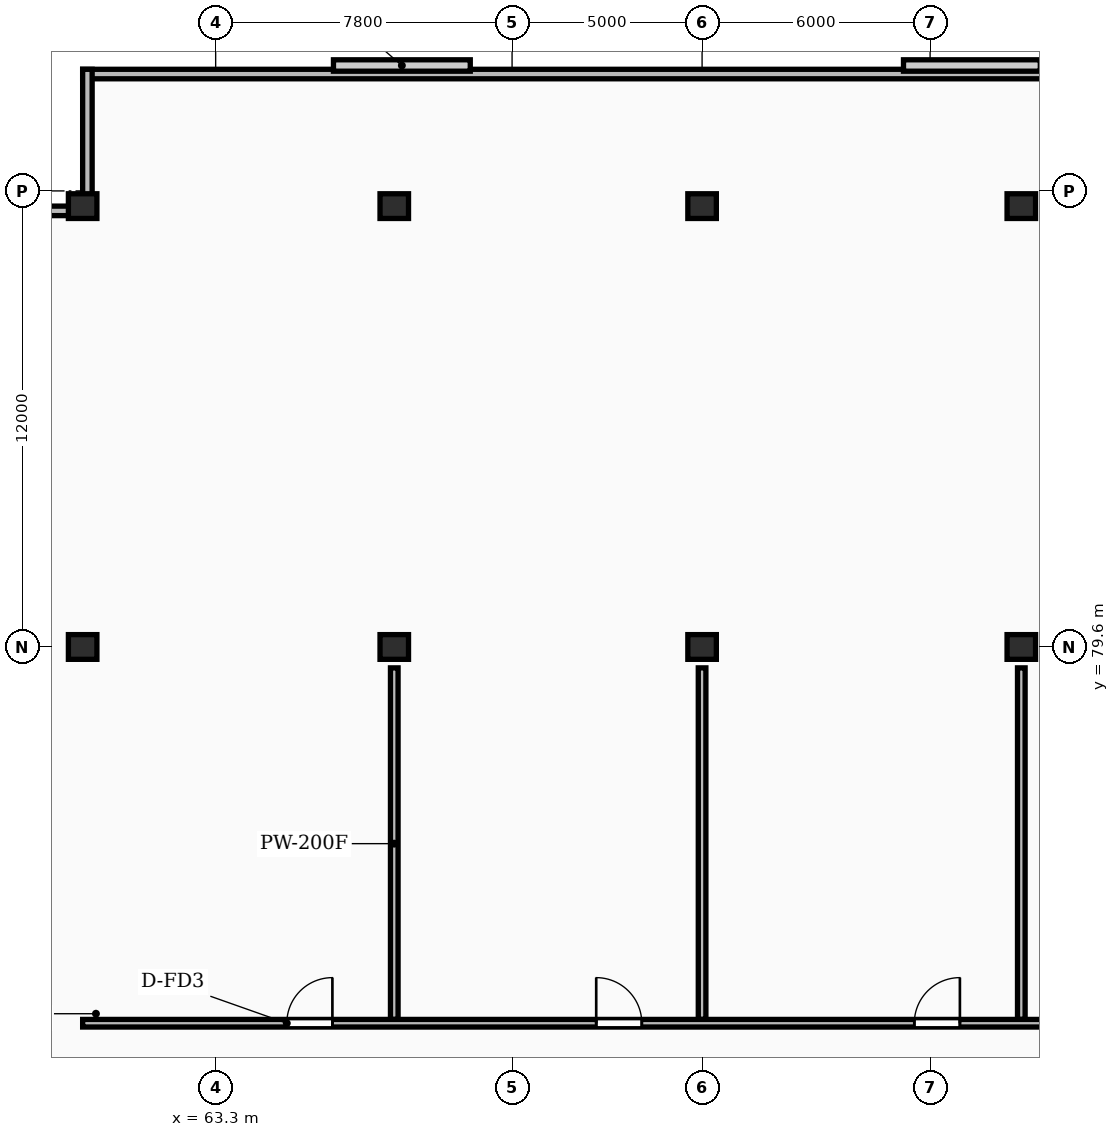
"""IFC4 building model, lengths in metres.
Left out: names, types, materials, properties, quantities, classifications, styles, units other than length and angle.
Written with IfcOpenShell. Run it as: python <this file> out.ifc"""

import sys

from ifc_helpers import new_model, si_unit, direction, frame, frame_2d, origin, origin_2d, place, context, subcontext, project, spatial, rectangle, extrude, element, fill, save


model = new_model("IFC4")
c1 = context("Model", 3, precision=1e-05, world=origin(), true_north=direction((0.0, 1.0)))
c2 = subcontext(c1, "Body", "Model", "MODEL_VIEW")
j1 = project(units=[si_unit("LENGTHUNIT", "METRE"), si_unit("PLANEANGLEUNIT", "RADIAN")], contexts=[c1])
p1 = place(None, origin())
s1 = spatial("IfcSite", under=j1, at=p1, CompositionType="ELEMENT")
p2 = place(p1, origin())
s2 = spatial("IfcBuilding", under=s1, at=p2, CompositionType="ELEMENT")
p3 = place(p2, frame((0.0, 0.0, 259.7)))
s3 = spatial("IfcBuildingStorey", under=s2, at=p3, CompositionType="ELEMENT", Elevation=259.7)
for number, where, z_axis, x_axis in (
    (1, (59.8, 79.6, 0.0), (0.0, 0.0, 1.0), (1.0, 0.0, 0.0)),
    (2, (59.8, 91.2, 0.0), (0.0, 0.0, 1.0), (1.0, 0.0, 0.0)),
    (3, (68.0, 79.6, 0.0), (0.0, 0.0, 1.0), (1.0, 0.0, 0.0)),
    (4, (68.0, 91.2, 0.0), (0.0, 0.0, 1.0), (1.0, 0.0, 0.0)),
    (5, (76.1, 79.6, 0.0), (0.0, 0.0, 1.0), (1.0, 0.0, 0.0)),
    (6, (76.1, 91.2, 0.0), (0.0, 0.0, 1.0), (1.0, 0.0, 0.0)),
    (7, (84.5, 79.6, 0.0), (0.0, 0.0, 1.0), (1.0, 0.0, 0.0)),
    (8, (84.5, 91.2, 0.0), (0.0, 0.0, 1.0), (1.0, 0.0, 0.0)),
):
    element("IfcColumn", number, at=place(p3, frame(where, z_axis=z_axis, x_axis=x_axis)), inside=s3, PredefinedType="COLUMN", context=c2, shape_type="SweptSolid", body=[
        extrude(rectangle(XDim=0.75, YDim=0.65, at=origin_2d()), origin(), (0.0, 0.0, 1.0), 4.5),
    ])
p4 = place(p3, frame((128.4, 94.675, 0.0), z_axis=(0.0, 0.0, 1.0), x_axis=(-1.0, 0.0, 0.0)))
e9 = element("IfcWall", 9, at=p4, inside=s3, PredefinedType="SHEAR", context=c2, shape_type="SweptSolid", body=[
    extrude(rectangle(XDim=68.6, YDim=0.25, at=frame_2d((34.3, 0.0))), origin(), (0.0, 0.0, 1.0), 4.23),
])
for number, where, z_axis, x_axis in (
    (10, (59.925, 94.8, 0.0), (0.0, 0.0, 1.0), (0.0, -1.0, 0.0)),
    (11, (59.8, 91.075, 0.0), (0.0, 0.0, 1.0), (-1.0, 0.0, 0.0)),
):
    element("IfcWall", number, at=place(p3, frame(where, z_axis=z_axis, x_axis=x_axis)), inside=s3, PredefinedType="SHEAR", context=c2, shape_type="SweptSolid", body=[
        extrude(rectangle(XDim=3.6, YDim=0.25, at=frame_2d((1.8, 0.0))), origin(), (0.0, 0.0, 1.0), 4.23),
    ])
for number, where, z_axis, x_axis in (
    (12, (68.0, 69.8, 0.0), (0.0, 0.0, 1.0), (0.0, 1.0, 0.0)),
    (13, (76.1, 69.8, 0.0), (0.0, 0.0, 1.0), (0.0, 1.0, 0.0)),
    (14, (84.5, 69.8, 0.0), (0.0, 0.0, 1.0), (0.0, 1.0, 0.0)),
):
    element("IfcWall", number, at=place(p3, frame(where, z_axis=z_axis, x_axis=x_axis)), inside=s3, PredefinedType="PARTITIONING", context=c2, shape_type="SweptSolid", body=[
        extrude(rectangle(XDim=9.25, YDim=0.2, at=frame_2d((4.625, 0.0))), origin(), (0.0, 0.0, 1.0), 3.537),
    ])
p5 = place(p3, frame((59.8, 69.7, 0.0), z_axis=(0.0, 0.0, 1.0), x_axis=(1.0, 0.0, 0.0)))
e15 = element("IfcWall", 15, at=p5, inside=s3, PredefinedType="PARTITIONING", context=c2, shape_type="SweptSolid", body=[
    extrude(rectangle(XDim=68.6, YDim=0.2, at=frame_2d((34.3, 0.0))), origin(), (0.0, 0.0, 1.0), 4.23),
])
p6 = place(p5, frame((5.372, 0.0, 0.0)))
e16 = element("IfcOpeningElement", 16, at=p6, cuts=e15, PredefinedType="OPENING", context=c2, shape_type="SweptSolid", body=[
    extrude(rectangle(XDim=1.2, YDim=2.15, at=frame_2d((0.6, 1.075))), frame((0.0, 0.11, 0.0), z_axis=(0.0, -1.0, 0.0), x_axis=(1.0, 0.0, 0.0)), (0.0, 0.0, 1.0), 0.22),
])
p7 = place(p5, frame((13.514, 0.0, 0.0)))
e17 = element("IfcOpeningElement", 17, at=p7, cuts=e15, PredefinedType="OPENING", context=c2, shape_type="SweptSolid", body=[
    extrude(rectangle(XDim=1.2, YDim=2.15, at=frame_2d((0.6, 1.075))), frame((0.0, 0.11, 0.0), z_axis=(0.0, -1.0, 0.0), x_axis=(1.0, 0.0, 0.0)), (0.0, 0.0, 1.0), 0.22),
])
p8 = place(p5, frame((21.884, 0.0, 0.0)))
e18 = element("IfcOpeningElement", 18, at=p8, cuts=e15, PredefinedType="OPENING", context=c2, shape_type="SweptSolid", body=[
    extrude(rectangle(XDim=1.2, YDim=2.15, at=frame_2d((0.6, 1.075))), frame((0.0, 0.11, 0.0), z_axis=(0.0, -1.0, 0.0), x_axis=(1.0, 0.0, 0.0)), (0.0, 0.0, 1.0), 0.22),
])
p9 = place(p5, frame((31.119, 0.0, 0.0)))
e19 = element("IfcOpeningElement", 19, at=p9, cuts=e15, PredefinedType="OPENING", context=c2, shape_type="SweptSolid", body=[
    extrude(rectangle(XDim=1.2, YDim=2.15, at=frame_2d((0.6, 1.075))), frame((0.0, 0.11, 0.0), z_axis=(0.0, -1.0, 0.0), x_axis=(1.0, 0.0, 0.0)), (0.0, 0.0, 1.0), 0.22),
])
p10 = place(p5, frame((35.481, 0.0, 0.0)))
e20 = element("IfcOpeningElement", 20, at=p10, cuts=e15, PredefinedType="OPENING", context=c2, shape_type="SweptSolid", body=[
    extrude(rectangle(XDim=1.2, YDim=2.15, at=frame_2d((0.6, 1.075))), frame((0.0, 0.11, 0.0), z_axis=(0.0, -1.0, 0.0), x_axis=(1.0, 0.0, 0.0)), (0.0, 0.0, 1.0), 0.22),
])
p11 = place(p5, frame((44.681, 0.0, 0.0)))
e21 = element("IfcOpeningElement", 21, at=p11, cuts=e15, PredefinedType="OPENING", context=c2, shape_type="SweptSolid", body=[
    extrude(rectangle(XDim=1.2, YDim=2.15, at=frame_2d((0.6, 1.075))), frame((0.0, 0.11, 0.0), z_axis=(0.0, -1.0, 0.0), x_axis=(1.0, 0.0, 0.0)), (0.0, 0.0, 1.0), 0.22),
])
p12 = place(p5, frame((53.896, 0.0, 0.0)))
e22 = element("IfcOpeningElement", 22, at=p12, cuts=e15, PredefinedType="OPENING", context=c2, shape_type="SweptSolid", body=[
    extrude(rectangle(XDim=1.2, YDim=2.15, at=frame_2d((0.6, 1.075))), frame((0.0, 0.11, 0.0), z_axis=(0.0, -1.0, 0.0), x_axis=(1.0, 0.0, 0.0)), (0.0, 0.0, 1.0), 0.22),
])
p13 = place(p5, frame((62.118, 0.0, 0.0)))
e23 = element("IfcOpeningElement", 23, at=p13, cuts=e15, PredefinedType="OPENING", context=c2, shape_type="SweptSolid", body=[
    extrude(rectangle(XDim=1.2, YDim=2.15, at=frame_2d((0.6, 1.075))), frame((0.0, 0.11, 0.0), z_axis=(0.0, -1.0, 0.0), x_axis=(1.0, 0.0, 0.0)), (0.0, 0.0, 1.0), 0.22),
])
p14 = place(p6, origin())
e24 = element("IfcDoor", 24, at=p14, inside=s3, OperationType="SINGLE_SWING_RIGHT", PredefinedType="DOOR", context=c2, shape_type="SweptSolid", body=[
    extrude(rectangle(XDim=1.2, YDim=2.15, at=frame_2d((0.6, 1.075))), frame((0.0, 0.025, 0.0), z_axis=(0.0, -1.0, 0.0), x_axis=(1.0, 0.0, 0.0)), (0.0, 0.0, 1.0), 0.05),
])
fill(e16, e24)
p15 = place(p7, origin())
e25 = element("IfcDoor", 25, at=p15, inside=s3, OperationType="SINGLE_SWING_LEFT", PredefinedType="DOOR", context=c2, shape_type="SweptSolid", body=[
    extrude(rectangle(XDim=1.2, YDim=2.15, at=frame_2d((0.6, 1.075))), frame((0.0, 0.025, 0.0), z_axis=(0.0, -1.0, 0.0), x_axis=(1.0, 0.0, 0.0)), (0.0, 0.0, 1.0), 0.05),
])
fill(e17, e25)
p16 = place(p8, origin())
e26 = element("IfcDoor", 26, at=p16, inside=s3, OperationType="SINGLE_SWING_RIGHT", PredefinedType="DOOR", context=c2, shape_type="SweptSolid", body=[
    extrude(rectangle(XDim=1.2, YDim=2.15, at=frame_2d((0.6, 1.075))), frame((0.0, 0.025, 0.0), z_axis=(0.0, -1.0, 0.0), x_axis=(1.0, 0.0, 0.0)), (0.0, 0.0, 1.0), 0.05),
])
fill(e18, e26)
save(model, sys.argv[1])
